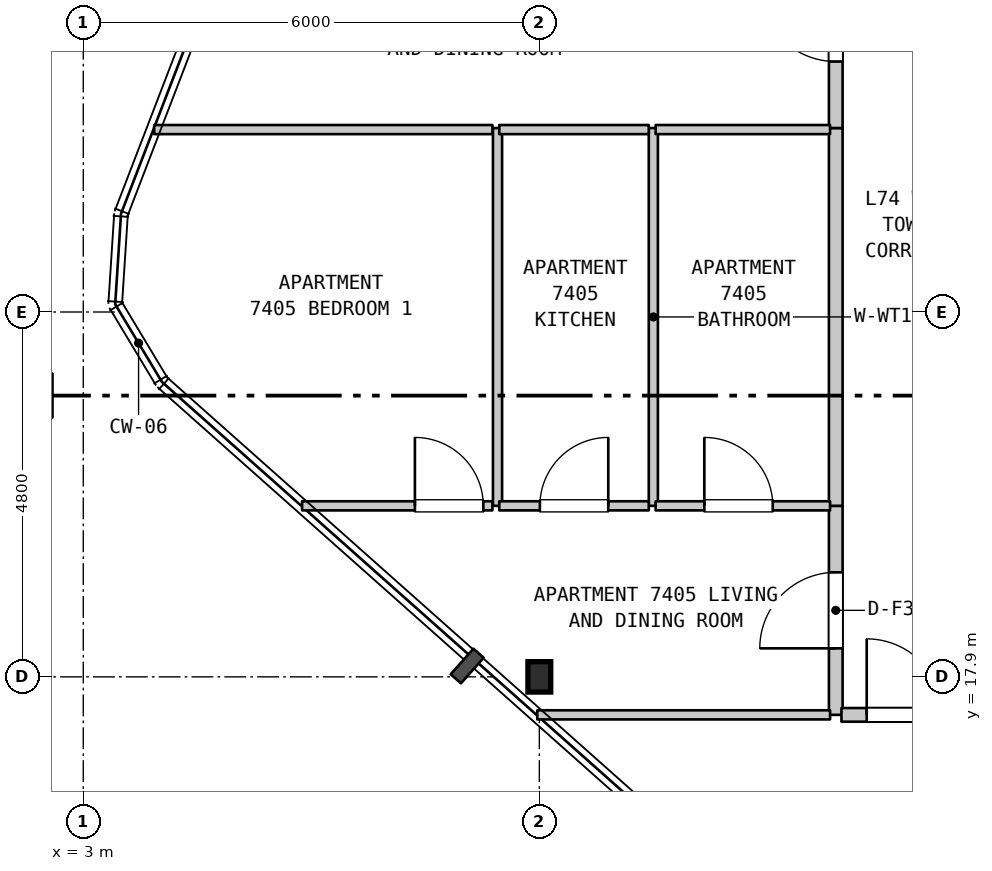
"""IFC4 building model, lengths in metres.
Left out: names, types, materials, properties, quantities, classifications, styles, units other than length and angle.
Written with IfcOpenShell. Run it as: python <this file> out.ifc"""

import sys

from ifc_helpers import new_model, si_unit, direction, frame, frame_2d, origin, origin_2d, place, context, subcontext, project, spatial, rectangle, i_section, extrude, element, fill, save


model = new_model("IFC4")
c1 = context("Model", 3, precision=1e-05, world=origin(), true_north=direction((0.0, 1.0)))
c2 = subcontext(c1, "Body", "Model", "MODEL_VIEW")
j1 = project(units=[si_unit("LENGTHUNIT", "METRE"), si_unit("PLANEANGLEUNIT", "RADIAN")], contexts=[c1])
p1 = place(None, origin())
s1 = spatial("IfcSite", under=j1, at=p1, CompositionType="ELEMENT")
p2 = place(p1, origin())
s2 = spatial("IfcBuilding", under=s1, at=p2, CompositionType="ELEMENT")
p3 = place(p2, frame((0.0, 0.0, 295.4)))
s3 = spatial("IfcBuildingStorey", under=s2, at=p3, CompositionType="ELEMENT", Elevation=295.4)
p4 = place(p3, frame((9.0, 17.9, 0.0), z_axis=(0.0, 0.0, 1.0), x_axis=(1.0, 0.0, 0.0)))
e1 = element("IfcColumn", 1, at=p4, inside=s3, PredefinedType="COLUMN", context=c2, shape_type="SweptSolid", body=[
    extrude(i_section(OverallWidth=0.3, OverallDepth=0.4, WebThickness=0.013, FlangeThickness=0.024, FilletRadius=0.027, at=origin_2d()), origin(), (0.0, 0.0, 1.0), 3.7),
])
for number, where, z_axis, x_axis in (
    (2, (8.45, 20.15, 0.0), (0.0, 0.0, 1.0), (0.0, 1.0, 0.0)),
    (3, (10.5, 20.15, 0.0), (0.0, 0.0, 1.0), (0.0, 1.0, 0.0)),
):
    element("IfcWall", number, at=place(p3, frame(where, z_axis=z_axis, x_axis=x_axis)), inside=s3, PredefinedType="PARTITIONING", context=c2, shape_type="SweptSolid", body=[
        extrude(rectangle(XDim=4.97, YDim=0.12, at=frame_2d((2.485, 0.0))), origin(), (0.0, 0.0, 1.0), 3.38),
    ])
p5 = place(p3, frame((12.9, 17.4, 0.0), z_axis=(0.0, 0.0, 1.0), x_axis=(0.0, 1.0, 0.0)))
e4 = element("IfcWall", 4, at=p5, inside=s3, PredefinedType="STANDARD", context=c2, shape_type="SweptSolid", body=[
    extrude(rectangle(XDim=2.75, YDim=0.18, at=frame_2d((1.375, 0.0))), origin(), (0.0, 0.0, 1.0), 3.38),
])
p6 = place(p5, frame((0.875, 0.0, 0.0)))
e5 = element("IfcOpeningElement", 5, at=p6, cuts=e4, PredefinedType="OPENING", context=c2, shape_type="SweptSolid", body=[
    extrude(rectangle(XDim=1.0, YDim=2.15, at=frame_2d((0.5, 1.075))), frame((0.0, 0.1, 0.0), z_axis=(0.0, -1.0, 0.0), x_axis=(1.0, 0.0, 0.0)), (0.0, 0.0, 1.0), 0.2),
])
p7 = place(p3, frame((12.9, 20.15, 0.0), z_axis=(0.0, 0.0, 1.0), x_axis=(0.0, 1.0, 0.0)))
e6 = element("IfcWall", 6, at=p7, inside=s3, PredefinedType="STANDARD", context=c2, shape_type="SweptSolid", body=[
    extrude(rectangle(XDim=4.97, YDim=0.18, at=frame_2d((2.485, 0.0))), origin(), (0.0, 0.0, 1.0), 3.38),
])
p8 = place(p3, frame((12.9, 25.12, 0.0), z_axis=(0.0, 0.0, 1.0), x_axis=(0.0, 1.0, 0.0)))
e7 = element("IfcWall", 7, at=p8, inside=s3, PredefinedType="STANDARD", context=c2, shape_type="SweptSolid", body=[
    extrude(rectangle(XDim=2.75, YDim=0.18, at=frame_2d((1.375, 0.0))), origin(), (0.0, 0.0, 1.0), 3.38),
])
p9 = place(p8, frame((0.875, 0.0, 0.0)))
e8 = element("IfcOpeningElement", 8, at=p9, cuts=e7, PredefinedType="OPENING", context=c2, shape_type="SweptSolid", body=[
    extrude(rectangle(XDim=1.0, YDim=2.15, at=frame_2d((0.5, 1.075))), frame((0.0, 0.1, 0.0), z_axis=(0.0, -1.0, 0.0), x_axis=(1.0, 0.0, 0.0)), (0.0, 0.0, 1.0), 0.2),
])
p10 = place(p3, frame((8.973, 17.4, 0.0), z_axis=(0.0, 0.0, 1.0), x_axis=(1.0, 0.0, 0.0)))
e9 = element("IfcWall", 9, at=p10, inside=s3, PredefinedType="PARTITIONING", context=c2, shape_type="SweptSolid", body=[
    extrude(rectangle(XDim=3.852, YDim=0.12, at=frame_2d((1.926, 0.0))), origin(), (0.0, 0.0, 1.0), 3.38),
])
p11 = place(p3, frame((12.975, 17.4, 0.0), z_axis=(0.0, 0.0, 1.0), x_axis=(1.0, 0.0, 0.0)))
e10 = element("IfcWall", 10, at=p11, inside=s3, PredefinedType="STANDARD", context=c2, shape_type="SweptSolid", body=[
    extrude(rectangle(XDim=3.18, YDim=0.18, at=frame_2d((1.59, 0.0))), origin(), (0.0, 0.0, 1.0), 3.38),
])
p12 = place(p11, frame((0.332, 0.0, 0.0)))
e11 = element("IfcOpeningElement", 11, at=p12, cuts=e10, PredefinedType="OPENING", context=c2, shape_type="SweptSolid", body=[
    extrude(rectangle(XDim=1.0, YDim=2.15, at=frame_2d((0.5, 1.075))), frame((0.0, 0.1, 0.0), z_axis=(0.0, -1.0, 0.0), x_axis=(1.0, 0.0, 0.0)), (0.0, 0.0, 1.0), 0.2),
])
p13 = place(p3, frame((5.879, 20.15, 0.0), z_axis=(0.0, 0.0, 1.0), x_axis=(1.0, 0.0, 0.0)))
e12 = element("IfcWall", 12, at=p13, inside=s3, PredefinedType="PARTITIONING", context=c2, shape_type="SweptSolid", body=[
    extrude(rectangle(XDim=2.504, YDim=0.12, at=frame_2d((1.252, 0.0))), origin(), (0.0, 0.0, 1.0), 3.38),
])
p14 = place(p13, frame((1.484, 0.0, 0.0)))
e13 = element("IfcOpeningElement", 13, at=p14, cuts=e12, PredefinedType="OPENING", context=c2, shape_type="SweptSolid", body=[
    extrude(rectangle(XDim=0.9, YDim=2.15, at=frame_2d((0.45, 1.075))), frame((0.0, 0.07, 0.0), z_axis=(0.0, -1.0, 0.0), x_axis=(1.0, 0.0, 0.0)), (0.0, 0.0, 1.0), 0.14),
])
p15 = place(p3, frame((8.473, 20.15, 0.0), z_axis=(0.0, 0.0, 1.0), x_axis=(1.0, 0.0, 0.0)))
e14 = element("IfcWall", 14, at=p15, inside=s3, PredefinedType="PARTITIONING", context=c2, shape_type="SweptSolid", body=[
    extrude(rectangle(XDim=1.967, YDim=0.12, at=frame_2d((0.983, 0.0))), origin(), (0.0, 0.0, 1.0), 3.38),
])
p16 = place(p15, frame((0.534, 0.0, 0.0)))
e15 = element("IfcOpeningElement", 15, at=p16, cuts=e14, PredefinedType="OPENING", context=c2, shape_type="SweptSolid", body=[
    extrude(rectangle(XDim=0.9, YDim=2.15, at=frame_2d((0.45, 1.075))), frame((0.0, 0.07, 0.0), z_axis=(0.0, -1.0, 0.0), x_axis=(1.0, 0.0, 0.0)), (0.0, 0.0, 1.0), 0.14),
])
p17 = place(p3, frame((10.53, 20.15, 0.0), z_axis=(0.0, 0.0, 1.0), x_axis=(1.0, 0.0, 0.0)))
e16 = element("IfcWall", 16, at=p17, inside=s3, PredefinedType="PARTITIONING", context=c2, shape_type="SweptSolid", body=[
    extrude(rectangle(XDim=2.295, YDim=0.12, at=frame_2d((1.147, 0.0))), origin(), (0.0, 0.0, 1.0), 3.38),
])
p18 = place(p17, frame((0.641, 0.0, 0.0)))
e17 = element("IfcOpeningElement", 17, at=p18, cuts=e16, PredefinedType="OPENING", context=c2, shape_type="SweptSolid", body=[
    extrude(rectangle(XDim=0.9, YDim=2.1, at=frame_2d((0.45, 1.05))), frame((0.0, 0.07, 0.0), z_axis=(0.0, -1.0, 0.0), x_axis=(1.0, 0.0, 0.0)), (0.0, 0.0, 1.0), 0.14),
])
p19 = place(p3, frame((3.933, 25.1, 0.0), z_axis=(0.0, 0.0, 1.0), x_axis=(1.0, 0.0, 0.0)))
e18 = element("IfcWall", 18, at=p19, inside=s3, PredefinedType="PARTITIONING", context=c2, shape_type="SweptSolid", body=[
    extrude(rectangle(XDim=4.45, YDim=0.12, at=frame_2d((2.225, 0.0))), origin(), (0.0, 0.0, 1.0), 3.38),
])
p20 = place(p3, frame((8.473, 25.1, 0.0), z_axis=(0.0, 0.0, 1.0), x_axis=(1.0, 0.0, 0.0)))
e19 = element("IfcWall", 19, at=p20, inside=s3, PredefinedType="PARTITIONING", context=c2, shape_type="SweptSolid", body=[
    extrude(rectangle(XDim=1.967, YDim=0.12, at=frame_2d((0.983, 0.0))), origin(), (0.0, 0.0, 1.0), 3.38),
])
p21 = place(p3, frame((10.53, 25.1, 0.0), z_axis=(0.0, 0.0, 1.0), x_axis=(1.0, 0.0, 0.0)))
e20 = element("IfcWall", 20, at=p21, inside=s3, PredefinedType="PARTITIONING", context=c2, shape_type="SweptSolid", body=[
    extrude(rectangle(XDim=2.295, YDim=0.12, at=frame_2d((1.147, 0.0))), origin(), (0.0, 0.0, 1.0), 3.38),
])
p22 = place(p6, origin())
e21 = element("IfcDoor", 21, at=p22, inside=s3, OperationType="SINGLE_SWING_LEFT", PredefinedType="DOOR", context=c2, shape_type="SweptSolid", body=[
    extrude(rectangle(XDim=1.0, YDim=2.15, at=frame_2d((0.5, 1.075))), frame((0.0, 0.025, 0.0), z_axis=(0.0, -1.0, 0.0), x_axis=(1.0, 0.0, 0.0)), (0.0, 0.0, 1.0), 0.05),
])
fill(e5, e21)
p23 = place(p9, origin())
e22 = element("IfcDoor", 22, at=p23, inside=s3, OperationType="SINGLE_SWING_RIGHT", PredefinedType="DOOR", context=c2, shape_type="SweptSolid", body=[
    extrude(rectangle(XDim=1.0, YDim=2.15, at=frame_2d((0.5, 1.075))), frame((0.0, 0.025, 0.0), z_axis=(0.0, -1.0, 0.0), x_axis=(1.0, 0.0, 0.0)), (0.0, 0.0, 1.0), 0.05),
])
fill(e8, e22)
p24 = place(p12, origin())
e23 = element("IfcDoor", 23, at=p24, inside=s3, OperationType="SINGLE_SWING_LEFT", PredefinedType="DOOR", context=c2, shape_type="SweptSolid", body=[
    extrude(rectangle(XDim=1.0, YDim=2.15, at=frame_2d((0.5, 1.075))), frame((0.0, 0.025, 0.0), z_axis=(0.0, -1.0, 0.0), x_axis=(1.0, 0.0, 0.0)), (0.0, 0.0, 1.0), 0.05),
])
fill(e11, e23)
p25 = place(p14, origin())
e24 = element("IfcDoor", 24, at=p25, inside=s3, OperationType="SINGLE_SWING_LEFT", PredefinedType="DOOR", context=c2, shape_type="SweptSolid", body=[
    extrude(rectangle(XDim=0.9, YDim=2.15, at=frame_2d((0.45, 1.075))), frame((0.0, 0.025, 0.0), z_axis=(0.0, -1.0, 0.0), x_axis=(1.0, 0.0, 0.0)), (0.0, 0.0, 1.0), 0.05),
])
fill(e13, e24)
p26 = place(p16, origin())
e25 = element("IfcDoor", 25, at=p26, inside=s3, OperationType="SINGLE_SWING_RIGHT", PredefinedType="DOOR", context=c2, shape_type="SweptSolid", body=[
    extrude(rectangle(XDim=0.9, YDim=2.15, at=frame_2d((0.45, 1.075))), frame((0.0, 0.025, 0.0), z_axis=(0.0, -1.0, 0.0), x_axis=(1.0, 0.0, 0.0)), (0.0, 0.0, 1.0), 0.05),
])
fill(e15, e25)
p27 = place(p18, origin())
e26 = element("IfcDoor", 26, at=p27, inside=s3, OperationType="SINGLE_SWING_LEFT", PredefinedType="DOOR", context=c2, shape_type="SweptSolid", body=[
    extrude(rectangle(XDim=0.9, YDim=2.1, at=frame_2d((0.45, 1.05))), frame((0.0, 0.025, 0.0), z_axis=(0.0, -1.0, 0.0), x_axis=(1.0, 0.0, 0.0)), (0.0, 0.0, 1.0), 0.05),
])
fill(e17, e26)
save(model, sys.argv[1])
